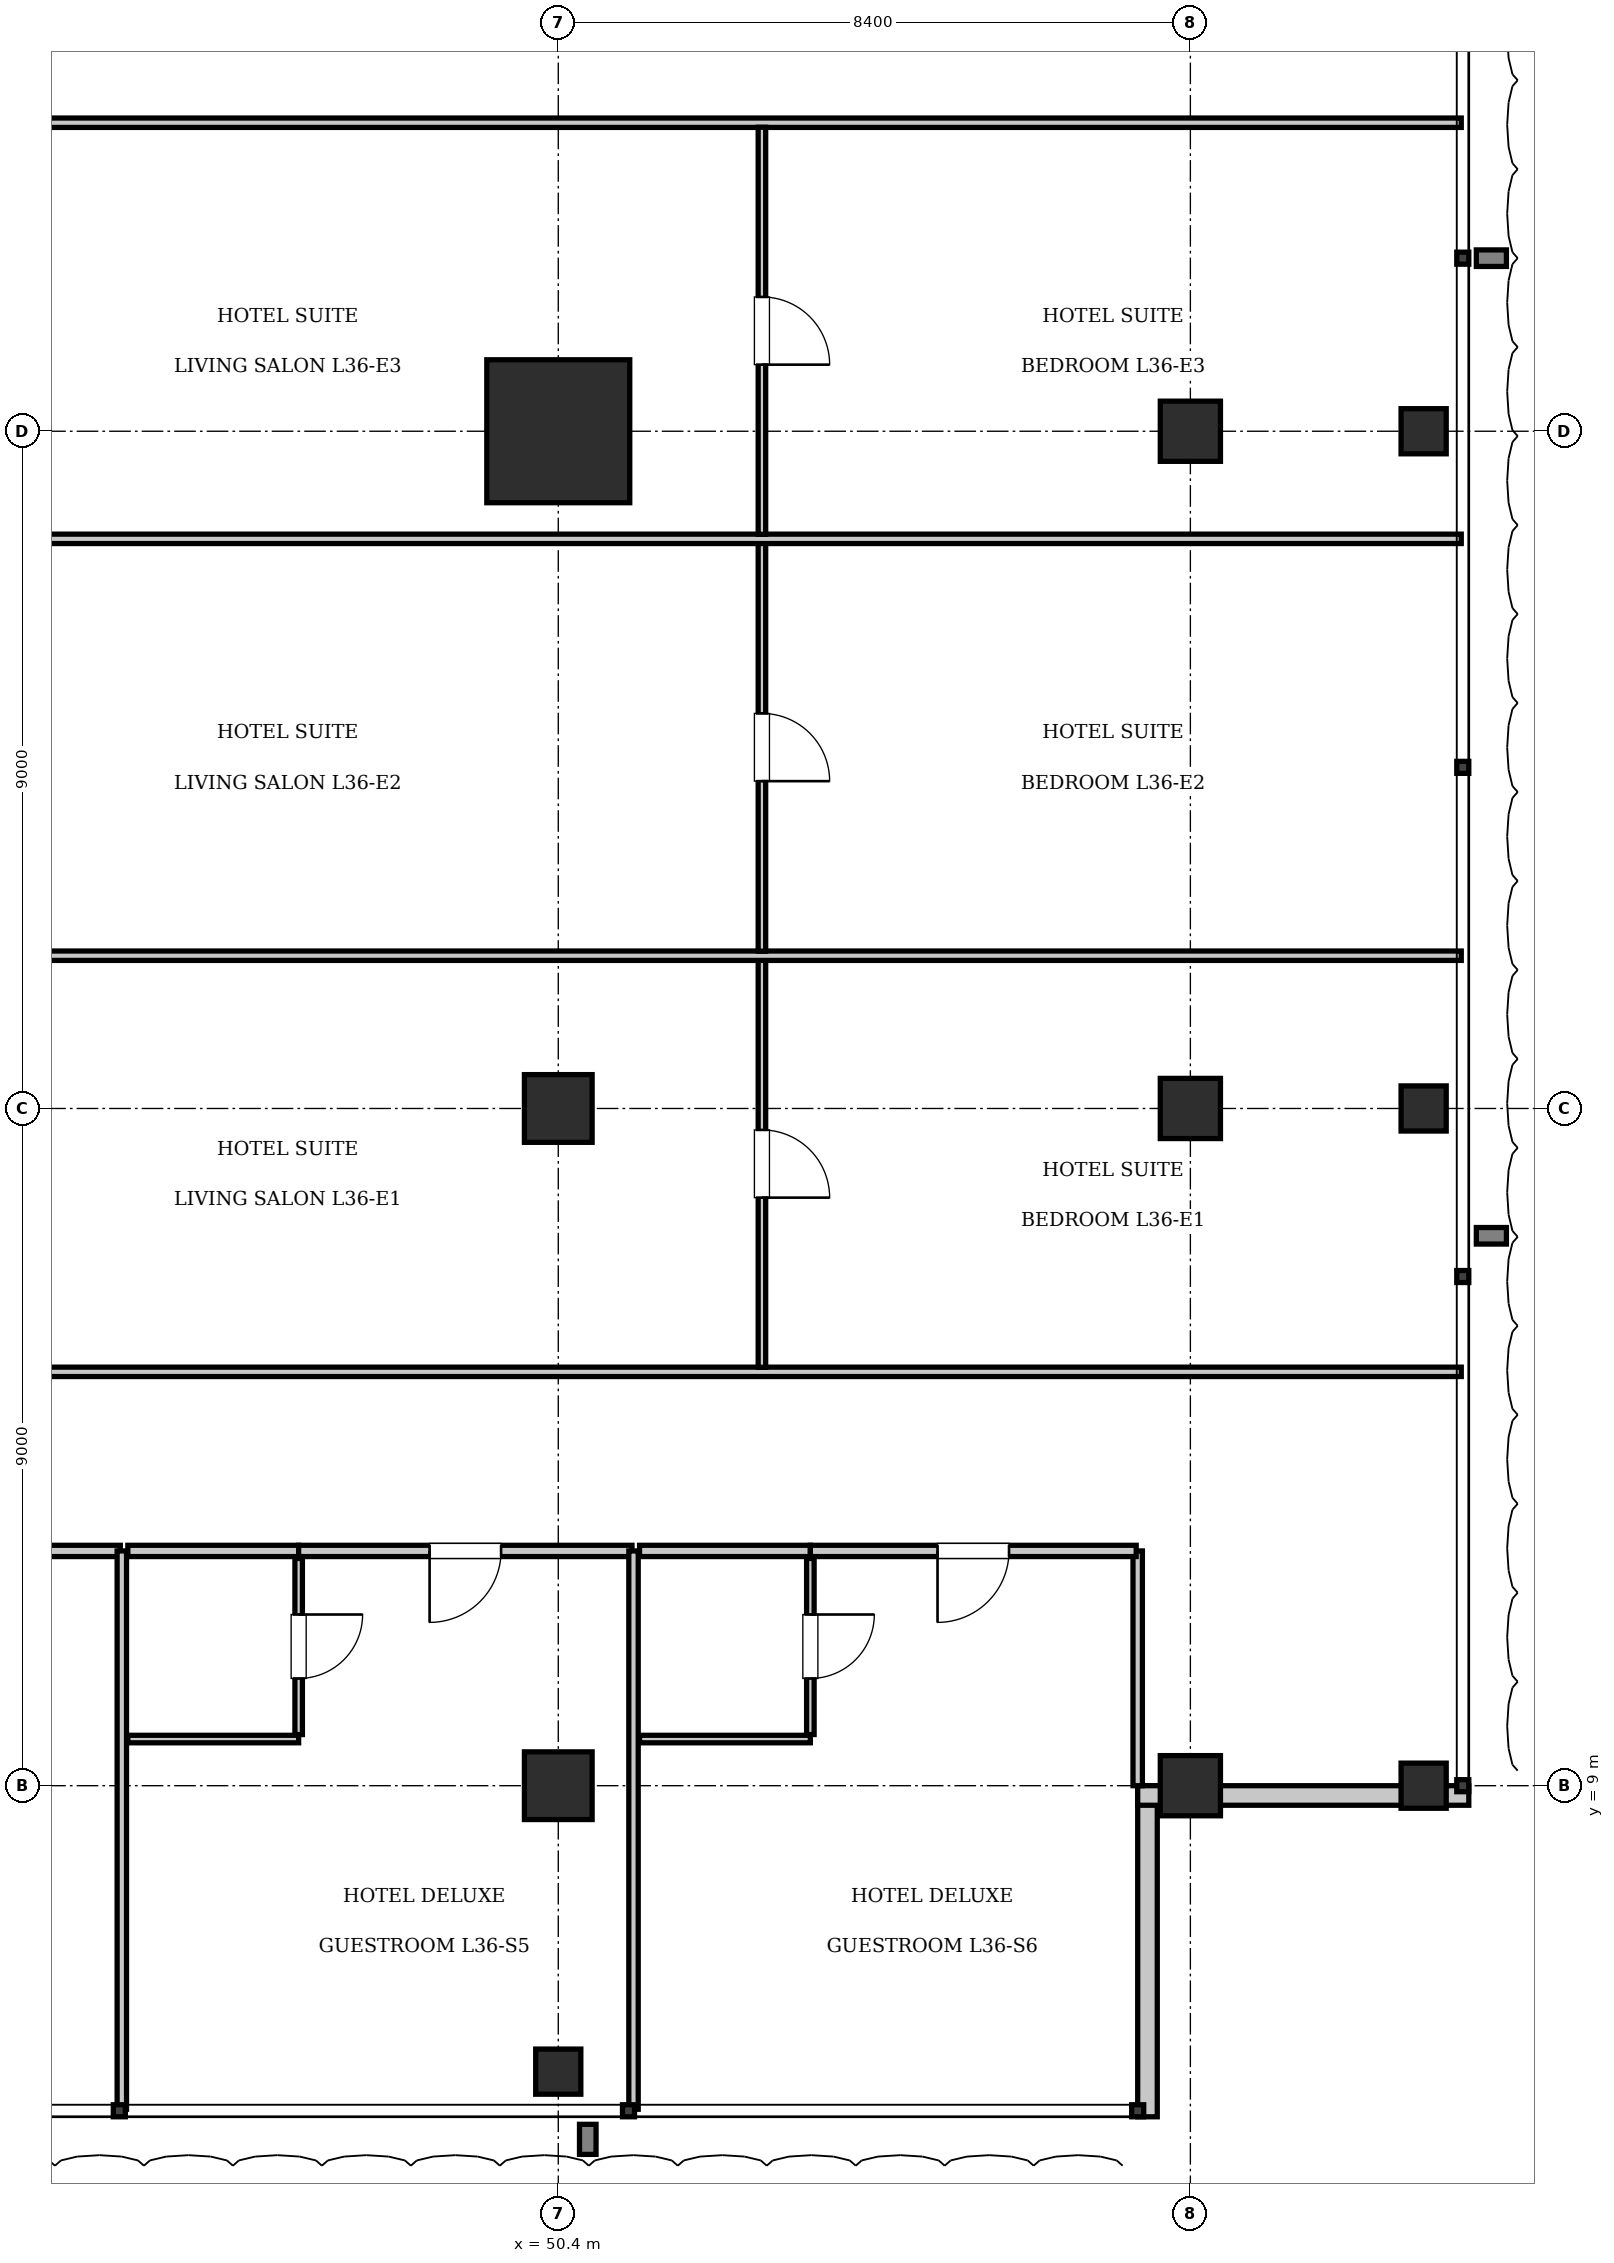
"""IFC4 building model, lengths in metres.
Left out: names, types, materials, properties, quantities, classifications, styles, units other than length and angle.
Written with IfcOpenShell. Run it as: python <this file> out.ifc"""

import sys

from ifc_helpers import new_model, si_unit, direction, frame, frame_2d, origin, origin_2d, place, context, subcontext, project, spatial, rectangle, i_section, extrude, element, fill, save


model = new_model("IFC4")
c1 = context("Model", 3, precision=1e-05, world=origin(), true_north=direction((0.0, 1.0)))
c2 = subcontext(c1, "Body", "Model", "MODEL_VIEW")
j1 = project(units=[si_unit("LENGTHUNIT", "METRE"), si_unit("PLANEANGLEUNIT", "RADIAN")], contexts=[c1])
p1 = place(None, origin())
s1 = spatial("IfcSite", under=j1, at=p1, CompositionType="ELEMENT")
p2 = place(p1, origin())
s2 = spatial("IfcBuilding", under=s1, at=p2, CompositionType="ELEMENT")
p3 = place(p2, frame((0.0, 0.0, 150.5)))
s3 = spatial("IfcBuildingStorey", under=s2, at=p3, CompositionType="ELEMENT", Elevation=150.5)
p4 = place(p3, frame((50.4, 27.0, 0.0), z_axis=(0.0, 0.0, 1.0), x_axis=(1.0, 0.0, 0.0)))
e1 = element("IfcColumn", 1, at=p4, inside=s3, PredefinedType="COLUMN", context=c2, shape_type="SweptSolid", body=[
    extrude(rectangle(XDim=1.9, YDim=1.9, at=origin_2d()), origin(), (0.0, 0.0, 1.0), 3.85),
])
for number, where, z_axis, x_axis in (
    (2, (50.4, 18.0, 0.0), (0.0, 0.0, 1.0), (1.0, 0.0, 0.0)),
    (3, (50.4, 9.0, 0.0), (0.0, 0.0, 1.0), (1.0, 0.0, 0.0)),
):
    element("IfcColumn", number, at=place(p3, frame(where, z_axis=z_axis, x_axis=x_axis)), inside=s3, PredefinedType="COLUMN", context=c2, shape_type="SweptSolid", body=[
        extrude(rectangle(XDim=0.9, YDim=0.9, at=origin_2d()), origin(), (0.0, 0.0, 1.0), 3.85),
    ])
for number, where, z_axis, x_axis in (
    (4, (58.8, 9.0, 0.0), (0.0, 0.0, 1.0), (1.0, 0.0, 0.0)),
    (5, (58.8, 18.0, 0.0), (0.0, 0.0, 1.0), (1.0, 0.0, 0.0)),
    (6, (58.8, 27.0, 0.0), (0.0, 0.0, 1.0), (1.0, 0.0, 0.0)),
):
    element("IfcColumn", number, at=place(p3, frame(where, z_axis=z_axis, x_axis=x_axis)), inside=s3, PredefinedType="COLUMN", context=c2, shape_type="SweptSolid", body=[
        extrude(rectangle(XDim=0.8, YDim=0.8, at=origin_2d()), origin(), (0.0, 0.0, 1.0), 3.85),
    ])
for number, where, z_axis, x_axis in (
    (7, (61.9, 9.0, 0.0), (0.0, 0.0, 1.0), (1.0, 0.0, 0.0)),
    (8, (61.9, 18.0, 0.0), (0.0, 0.0, 1.0), (1.0, 0.0, 0.0)),
    (9, (61.9, 27.0, 0.0), (0.0, 0.0, 1.0), (1.0, 0.0, 0.0)),
    (10, (50.4, 5.2, 0.0), (0.0, 0.0, 1.0), (1.0, 0.0, 0.0)),
):
    element("IfcColumn", number, at=place(p3, frame(where, z_axis=z_axis, x_axis=x_axis)), inside=s3, PredefinedType="COLUMN", context=c2, shape_type="SweptSolid", body=[
        extrude(i_section(OverallWidth=0.6, OverallDepth=0.6, WebThickness=0.025, FlangeThickness=0.038, at=origin_2d()), origin(), (0.0, 0.0, 1.0), 3.85),
    ])
p5 = place(p3, frame((58.23, 9.0, 0.0), z_axis=(0.0, 0.0, 1.0), x_axis=(0.0, -1.0, 0.0)))
e11 = element("IfcWall", 11, at=p5, inside=s3, PredefinedType="SOLIDWALL", context=c2, shape_type="SweptSolid", body=[
    extrude(rectangle(XDim=4.4, YDim=0.26, at=frame_2d((2.2, 0.0))), origin(), (0.0, 0.0, 1.0), 3.61),
])
p6 = place(p3, frame((62.5, 8.87, 0.0), z_axis=(0.0, 0.0, 1.0), x_axis=(-1.0, 0.0, 0.0)))
e12 = element("IfcWall", 12, at=p6, inside=s3, PredefinedType="SOLIDWALL", context=c2, shape_type="SweptSolid", body=[
    extrude(rectangle(XDim=4.4, YDim=0.26, at=frame_2d((2.2, 0.0))), origin(), (0.0, 0.0, 1.0), 2.998),
])
p7 = place(p3, frame((58.1, 9.0, 0.0), z_axis=(0.0, 0.0, 1.0), x_axis=(0.0, 1.0, 0.0)))
e13 = element("IfcWall", 13, at=p7, inside=s3, PredefinedType="PARTITIONING", context=c2, shape_type="SweptSolid", body=[
    extrude(rectangle(XDim=3.12, YDim=0.125, at=frame_2d((1.56, 0.0))), origin(), (0.0, 0.0, 1.0), 3.61),
])
p8 = place(p3, frame((40.15, 12.12, 0.0), z_axis=(0.0, 0.0, 1.0), x_axis=(1.0, 0.0, 0.0)))
e14 = element("IfcWall", 14, at=p8, inside=s3, PredefinedType="PARTITIONING", context=c2, shape_type="SweptSolid", body=[
    extrude(rectangle(XDim=4.43, YDim=0.15, at=frame_2d((2.215, 0.0))), origin(), (0.0, 0.0, 1.0), 3.61),
])
p9 = place(p8, frame((1.74, 0.0, 0.0)))
e15 = element("IfcOpeningElement", 15, at=p9, cuts=e14, PredefinedType="OPENING", context=c2, shape_type="SweptSolid", body=[
    extrude(rectangle(XDim=0.95, YDim=2.15, at=frame_2d((0.475, 1.075))), frame((0.0, 0.085, 0.0), z_axis=(0.0, -1.0, 0.0), x_axis=(1.0, 0.0, 0.0)), (0.0, 0.0, 1.0), 0.17),
])
p10 = place(p3, frame((44.6, 4.7, 0.0), z_axis=(0.0, 0.0, 1.0), x_axis=(0.0, 1.0, 0.0)))
e16 = element("IfcWall", 16, at=p10, inside=s3, PredefinedType="PARTITIONING", context=c2, shape_type="SweptSolid", body=[
    extrude(rectangle(XDim=7.42, YDim=0.125, at=frame_2d((3.71, 0.0))), origin(), (0.0, 0.0, 1.0), 3.61),
])
p11 = place(p3, frame((44.68, 12.12, 0.0), z_axis=(0.0, 0.0, 1.0), x_axis=(1.0, 0.0, 0.0)))
e17 = element("IfcWall", 17, at=p11, inside=s3, PredefinedType="PARTITIONING", context=c2, shape_type="SweptSolid", body=[
    extrude(rectangle(XDim=2.27, YDim=0.15, at=frame_2d((1.135, 0.0))), origin(), (0.0, 0.0, 1.0), 3.61),
])
p12 = place(p3, frame((44.68, 9.62, 0.0), z_axis=(0.0, 0.0, 1.0), x_axis=(1.0, 0.0, 0.0)))
e18 = element("IfcWall", 18, at=p12, inside=s3, PredefinedType="PARTITIONING", context=c2, shape_type="SweptSolid", body=[
    extrude(rectangle(XDim=2.27, YDim=0.1, at=frame_2d((1.135, 0.0))), origin(), (0.0, 0.0, 1.0), 3.61),
])
p13 = place(p3, frame((46.95, 9.68, 0.0), z_axis=(0.0, 0.0, 1.0), x_axis=(0.0, 1.0, 0.0)))
e19 = element("IfcWall", 19, at=p13, inside=s3, PredefinedType="PARTITIONING", context=c2, shape_type="SweptSolid", body=[
    extrude(rectangle(XDim=2.34, YDim=0.1, at=frame_2d((1.17, 0.0))), origin(), (0.0, 0.0, 1.0), 3.61),
])
p14 = place(p13, frame((0.745, 0.0, 0.0)))
e20 = element("IfcOpeningElement", 20, at=p14, cuts=e19, PredefinedType="OPENING", context=c2, shape_type="SweptSolid", body=[
    extrude(rectangle(XDim=0.85, YDim=2.1, at=frame_2d((0.425, 1.05))), frame((0.0, 0.06, 0.0), z_axis=(0.0, -1.0, 0.0), x_axis=(1.0, 0.0, 0.0)), (0.0, 0.0, 1.0), 0.12),
])
p15 = place(p3, frame((46.95, 12.12, 0.0), z_axis=(0.0, 0.0, 1.0), x_axis=(1.0, 0.0, 0.0)))
e21 = element("IfcWall", 21, at=p15, inside=s3, PredefinedType="PARTITIONING", context=c2, shape_type="SweptSolid", body=[
    extrude(rectangle(XDim=4.43, YDim=0.15, at=frame_2d((2.215, 0.0))), origin(), (0.0, 0.0, 1.0), 3.61),
])
p16 = place(p15, frame((1.74, 0.0, 0.0)))
e22 = element("IfcOpeningElement", 22, at=p16, cuts=e21, PredefinedType="OPENING", context=c2, shape_type="SweptSolid", body=[
    extrude(rectangle(XDim=0.95, YDim=2.15, at=frame_2d((0.475, 1.075))), frame((0.0, 0.085, 0.0), z_axis=(0.0, -1.0, 0.0), x_axis=(1.0, 0.0, 0.0)), (0.0, 0.0, 1.0), 0.17),
])
p17 = place(p3, frame((51.4, 4.7, 0.0), z_axis=(0.0, 0.0, 1.0), x_axis=(0.0, 1.0, 0.0)))
e23 = element("IfcWall", 23, at=p17, inside=s3, PredefinedType="PARTITIONING", context=c2, shape_type="SweptSolid", body=[
    extrude(rectangle(XDim=7.42, YDim=0.125, at=frame_2d((3.71, 0.0))), origin(), (0.0, 0.0, 1.0), 3.61),
])
p18 = place(p3, frame((51.48, 12.12, 0.0), z_axis=(0.0, 0.0, 1.0), x_axis=(1.0, 0.0, 0.0)))
e24 = element("IfcWall", 24, at=p18, inside=s3, PredefinedType="PARTITIONING", context=c2, shape_type="SweptSolid", body=[
    extrude(rectangle(XDim=2.27, YDim=0.15, at=frame_2d((1.135, 0.0))), origin(), (0.0, 0.0, 1.0), 3.61),
])
p19 = place(p3, frame((51.48, 9.62, 0.0), z_axis=(0.0, 0.0, 1.0), x_axis=(1.0, 0.0, 0.0)))
e25 = element("IfcWall", 25, at=p19, inside=s3, PredefinedType="PARTITIONING", context=c2, shape_type="SweptSolid", body=[
    extrude(rectangle(XDim=2.27, YDim=0.1, at=frame_2d((1.135, 0.0))), origin(), (0.0, 0.0, 1.0), 3.61),
])
p20 = place(p3, frame((53.75, 9.68, 0.0), z_axis=(0.0, 0.0, 1.0), x_axis=(0.0, 1.0, 0.0)))
e26 = element("IfcWall", 26, at=p20, inside=s3, PredefinedType="PARTITIONING", context=c2, shape_type="SweptSolid", body=[
    extrude(rectangle(XDim=2.34, YDim=0.1, at=frame_2d((1.17, 0.0))), origin(), (0.0, 0.0, 1.0), 3.61),
])
p21 = place(p20, frame((0.745, 0.0, 0.0)))
e27 = element("IfcOpeningElement", 27, at=p21, cuts=e26, PredefinedType="OPENING", context=c2, shape_type="SweptSolid", body=[
    extrude(rectangle(XDim=0.85, YDim=2.1, at=frame_2d((0.425, 1.05))), frame((0.0, 0.06, 0.0), z_axis=(0.0, -1.0, 0.0), x_axis=(1.0, 0.0, 0.0)), (0.0, 0.0, 1.0), 0.12),
])
p22 = place(p3, frame((53.75, 12.12, 0.0), z_axis=(0.0, 0.0, 1.0), x_axis=(1.0, 0.0, 0.0)))
e28 = element("IfcWall", 28, at=p22, inside=s3, PredefinedType="PARTITIONING", context=c2, shape_type="SweptSolid", body=[
    extrude(rectangle(XDim=4.33, YDim=0.15, at=frame_2d((2.165, 0.0))), origin(), (0.0, 0.0, 1.0), 3.61),
])
p23 = place(p22, frame((1.69, 0.0, 0.0)))
e29 = element("IfcOpeningElement", 29, at=p23, cuts=e28, PredefinedType="OPENING", context=c2, shape_type="SweptSolid", body=[
    extrude(rectangle(XDim=0.95, YDim=2.15, at=frame_2d((0.475, 1.075))), frame((0.0, 0.085, 0.0), z_axis=(0.0, -1.0, 0.0), x_axis=(1.0, 0.0, 0.0)), (0.0, 0.0, 1.0), 0.17),
])
for number, where, z_axis, x_axis in (
    (30, (40.48, 14.5, 0.0), (0.0, 0.0, 1.0), (1.0, 0.0, 0.0)),
    (31, (40.48, 31.1, 0.0), (0.0, 0.0, 1.0), (1.0, 0.0, 0.0)),
):
    element("IfcWall", number, at=place(p3, frame(where, z_axis=z_axis, x_axis=x_axis)), inside=s3, PredefinedType="PARTITIONING", context=c2, shape_type="SweptSolid", body=[
        extrude(rectangle(XDim=21.92, YDim=0.125, at=frame_2d((10.96, 0.0))), origin(), (0.0, 0.0, 1.0), 3.61),
    ])
p24 = place(p3, frame((53.106, 14.56, 0.0), z_axis=(0.0, 0.0, 1.0), x_axis=(0.0, 1.0, 0.0)))
e32 = element("IfcWall", 32, at=p24, inside=s3, PredefinedType="PARTITIONING", context=c2, shape_type="SweptSolid", body=[
    extrude(rectangle(XDim=5.41, YDim=0.1, at=frame_2d((2.705, 0.0))), origin(), (0.0, 0.0, 1.0), 3.61),
])
p25 = place(p24, frame((2.255, 0.0, 0.0)))
e33 = element("IfcOpeningElement", 33, at=p25, cuts=e32, PredefinedType="OPENING", context=c2, shape_type="SweptSolid", body=[
    extrude(rectangle(XDim=0.9, YDim=2.1, at=frame_2d((0.45, 1.05))), frame((0.0, 0.06, 0.0), z_axis=(0.0, -1.0, 0.0), x_axis=(1.0, 0.0, 0.0)), (0.0, 0.0, 1.0), 0.12),
])
p26 = place(p3, frame((40.48, 20.03, 0.0), z_axis=(0.0, 0.0, 1.0), x_axis=(1.0, 0.0, 0.0)))
e34 = element("IfcWall", 34, at=p26, inside=s3, PredefinedType="PARTITIONING", context=c2, shape_type="SweptSolid", body=[
    extrude(rectangle(XDim=21.92, YDim=0.125, at=frame_2d((10.96, 0.0))), origin(), (0.0, 0.0, 1.0), 3.61),
])
p27 = place(p3, frame((53.106, 20.09, 0.0), z_axis=(0.0, 0.0, 1.0), x_axis=(0.0, 1.0, 0.0)))
e35 = element("IfcWall", 35, at=p27, inside=s3, PredefinedType="PARTITIONING", context=c2, shape_type="SweptSolid", body=[
    extrude(rectangle(XDim=5.42, YDim=0.1, at=frame_2d((2.71, 0.0))), origin(), (0.0, 0.0, 1.0), 3.61),
])
p28 = place(p27, frame((2.26, 0.0, 0.0)))
e36 = element("IfcOpeningElement", 36, at=p28, cuts=e35, PredefinedType="OPENING", context=c2, shape_type="SweptSolid", body=[
    extrude(rectangle(XDim=0.9, YDim=2.1, at=frame_2d((0.45, 1.05))), frame((0.0, 0.06, 0.0), z_axis=(0.0, -1.0, 0.0), x_axis=(1.0, 0.0, 0.0)), (0.0, 0.0, 1.0), 0.12),
])
p29 = place(p3, frame((40.48, 25.57, 0.0), z_axis=(0.0, 0.0, 1.0), x_axis=(1.0, 0.0, 0.0)))
e37 = element("IfcWall", 37, at=p29, inside=s3, PredefinedType="PARTITIONING", context=c2, shape_type="SweptSolid", body=[
    extrude(rectangle(XDim=21.92, YDim=0.125, at=frame_2d((10.96, 0.0))), origin(), (0.0, 0.0, 1.0), 3.61),
])
p30 = place(p3, frame((53.106, 25.63, 0.0), z_axis=(0.0, 0.0, 1.0), x_axis=(0.0, 1.0, 0.0)))
e38 = element("IfcWall", 38, at=p30, inside=s3, PredefinedType="PARTITIONING", context=c2, shape_type="SweptSolid", body=[
    extrude(rectangle(XDim=5.41, YDim=0.1, at=frame_2d((2.705, 0.0))), origin(), (0.0, 0.0, 1.0), 3.61),
])
p31 = place(p30, frame((2.255, 0.0, 0.0)))
e39 = element("IfcOpeningElement", 39, at=p31, cuts=e38, PredefinedType="OPENING", context=c2, shape_type="SweptSolid", body=[
    extrude(rectangle(XDim=0.9, YDim=2.1, at=frame_2d((0.45, 1.05))), frame((0.0, 0.06, 0.0), z_axis=(0.0, -1.0, 0.0), x_axis=(1.0, 0.0, 0.0)), (0.0, 0.0, 1.0), 0.12),
])
p32 = place(p14, frame((0.85, 0.0, 0.0), z_axis=(0.0, 0.0, 1.0), x_axis=(-1.0, 0.0, 0.0)))
e40 = element("IfcDoor", 40, at=p32, inside=s3, OperationType="SINGLE_SWING_LEFT", PredefinedType="DOOR", context=c2, shape_type="SweptSolid", body=[
    extrude(rectangle(XDim=0.85, YDim=2.1, at=frame_2d((0.425, 1.05))), frame((0.0, 0.025, 0.0), z_axis=(0.0, -1.0, 0.0), x_axis=(1.0, 0.0, 0.0)), (0.0, 0.0, 1.0), 0.05),
])
fill(e20, e40)
p33 = place(p16, frame((0.95, 0.0, 0.0), z_axis=(0.0, 0.0, 1.0), x_axis=(-1.0, 0.0, 0.0)))
e41 = element("IfcDoor", 41, at=p33, inside=s3, OperationType="SINGLE_SWING_RIGHT", PredefinedType="DOOR", context=c2, shape_type="SweptSolid", body=[
    extrude(rectangle(XDim=0.95, YDim=2.15, at=frame_2d((0.475, 1.075))), frame((0.0, 0.025, 0.0), z_axis=(0.0, -1.0, 0.0), x_axis=(1.0, 0.0, 0.0)), (0.0, 0.0, 1.0), 0.05),
])
fill(e22, e41)
p34 = place(p21, frame((0.85, 0.0, 0.0), z_axis=(0.0, 0.0, 1.0), x_axis=(-1.0, 0.0, 0.0)))
e42 = element("IfcDoor", 42, at=p34, inside=s3, OperationType="SINGLE_SWING_LEFT", PredefinedType="DOOR", context=c2, shape_type="SweptSolid", body=[
    extrude(rectangle(XDim=0.85, YDim=2.1, at=frame_2d((0.425, 1.05))), frame((0.0, 0.025, 0.0), z_axis=(0.0, -1.0, 0.0), x_axis=(1.0, 0.0, 0.0)), (0.0, 0.0, 1.0), 0.05),
])
fill(e27, e42)
p35 = place(p23, frame((0.95, 0.0, 0.0), z_axis=(0.0, 0.0, 1.0), x_axis=(-1.0, 0.0, 0.0)))
e43 = element("IfcDoor", 43, at=p35, inside=s3, OperationType="SINGLE_SWING_RIGHT", PredefinedType="DOOR", context=c2, shape_type="SweptSolid", body=[
    extrude(rectangle(XDim=0.95, YDim=2.15, at=frame_2d((0.475, 1.075))), frame((0.0, 0.025, 0.0), z_axis=(0.0, -1.0, 0.0), x_axis=(1.0, 0.0, 0.0)), (0.0, 0.0, 1.0), 0.05),
])
fill(e29, e43)
p36 = place(p25, frame((0.9, 0.0, 0.0), z_axis=(0.0, 0.0, 1.0), x_axis=(-1.0, 0.0, 0.0)))
e44 = element("IfcDoor", 44, at=p36, inside=s3, OperationType="SINGLE_SWING_RIGHT", PredefinedType="DOOR", context=c2, shape_type="SweptSolid", body=[
    extrude(rectangle(XDim=0.9, YDim=2.1, at=frame_2d((0.45, 1.05))), frame((0.0, 0.025, 0.0), z_axis=(0.0, -1.0, 0.0), x_axis=(1.0, 0.0, 0.0)), (0.0, 0.0, 1.0), 0.05),
])
fill(e33, e44)
p37 = place(p28, frame((0.9, 0.0, 0.0), z_axis=(0.0, 0.0, 1.0), x_axis=(-1.0, 0.0, 0.0)))
e45 = element("IfcDoor", 45, at=p37, inside=s3, OperationType="SINGLE_SWING_RIGHT", PredefinedType="DOOR", context=c2, shape_type="SweptSolid", body=[
    extrude(rectangle(XDim=0.9, YDim=2.1, at=frame_2d((0.45, 1.05))), frame((0.0, 0.025, 0.0), z_axis=(0.0, -1.0, 0.0), x_axis=(1.0, 0.0, 0.0)), (0.0, 0.0, 1.0), 0.05),
])
fill(e36, e45)
p38 = place(p31, frame((0.9, 0.0, 0.0), z_axis=(0.0, 0.0, 1.0), x_axis=(-1.0, 0.0, 0.0)))
e46 = element("IfcDoor", 46, at=p38, inside=s3, OperationType="SINGLE_SWING_RIGHT", PredefinedType="DOOR", context=c2, shape_type="SweptSolid", body=[
    extrude(rectangle(XDim=0.9, YDim=2.1, at=frame_2d((0.45, 1.05))), frame((0.0, 0.025, 0.0), z_axis=(0.0, -1.0, 0.0), x_axis=(1.0, 0.0, 0.0)), (0.0, 0.0, 1.0), 0.05),
])
fill(e39, e46)
save(model, sys.argv[1])
